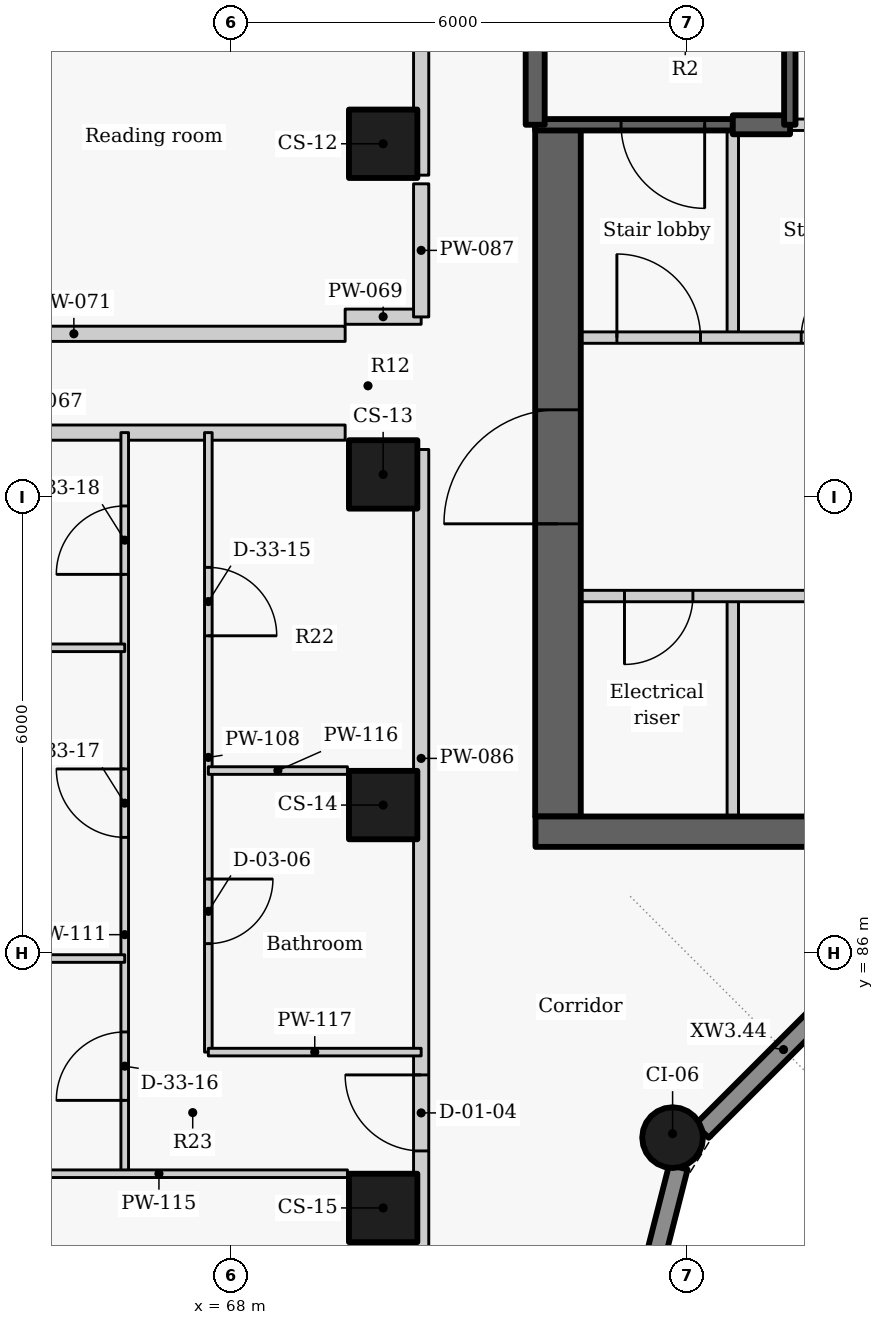
"""IFC4 building model, lengths in metres.
Left out: names, types, materials, properties, quantities, classifications, styles, units other than length and angle.
Written with IfcOpenShell. Run it as: python <this file> out.ifc"""

import sys

from ifc_helpers import new_model, si_unit, direction, frame, frame_2d, origin, origin_2d, place, context, subcontext, project, spatial, rectangle, circle, extrude, element, fill, save


model = new_model("IFC4")
c1 = context("Model", 3, precision=1e-05, world=origin(), true_north=direction((0.0, 1.0)))
c2 = subcontext(c1, "Body", "Model", "MODEL_VIEW")
j1 = project(units=[si_unit("LENGTHUNIT", "METRE"), si_unit("PLANEANGLEUNIT", "RADIAN")], contexts=[c1])
p1 = place(None, origin())
s1 = spatial("IfcSite", under=j1, at=p1, CompositionType="ELEMENT")
p2 = place(p1, origin())
s2 = spatial("IfcBuilding", under=s1, at=p2, CompositionType="ELEMENT")
p3 = place(p2, frame((0.0, 0.0, 229.5)))
s3 = spatial("IfcBuildingStorey", under=s2, at=p3, CompositionType="ELEMENT", Elevation=229.5)
for number, where, z_axis, x_axis in (
    (1, (70.0, 96.65, 0.0), (0.0, 0.0, 1.0), (0.0, -1.0, 0.0)),
    (2, (70.0, 92.3, 0.0), (0.0, 0.0, 1.0), (0.0, -1.0, 0.0)),
    (3, (70.0, 87.95, 0.0), (0.0, 0.0, 1.0), (0.0, -1.0, 0.0)),
    (4, (70.0, 82.65, 0.0), (0.0, 0.0, 1.0), (0.0, -1.0, 0.0)),
):
    element("IfcColumn", number, at=place(p3, frame(where, z_axis=z_axis, x_axis=x_axis)), inside=s3, PredefinedType="COLUMN", context=c2, shape_type="SweptSolid", body=[
        extrude(rectangle(XDim=0.9, YDim=0.9, at=origin_2d()), origin(), (0.0, 0.0, 1.0), 3.3),
    ])
p4 = place(p3, frame((73.808, 83.575, 0.0), z_axis=(0.0, 0.0, 1.0), x_axis=(-0.5, -0.866025403784, 0.0)))
e5 = element("IfcColumn", 5, at=p4, inside=s3, PredefinedType="COLUMN", context=c2, shape_type="SweptSolid", body=[
    extrude(circle(Radius=0.4, at=origin_2d()), origin(), (0.0, 0.0, 1.0), 3.3),
])
p5 = place(p3, frame((73.14, 80.27, 0.0), z_axis=(0.0, 0.0, 1.0), x_axis=(0.247055971283, 0.969001211069, 0.0)))
e6 = element("IfcWall", 6, at=p5, inside=s3, PredefinedType="SOLIDWALL", context=c2, shape_type="SweptSolid", body=[
    extrude(rectangle(XDim=3.01, YDim=0.25, at=frame_2d((1.505, 0.0))), origin(), (0.0, 0.0, 1.0), 2.425),
])
p6 = place(p3, frame((74.194, 83.661, 0.0), z_axis=(0.0, 0.0, 1.0), x_axis=(0.707106781187, 0.707106781187, 0.0)))
e7 = element("IfcWall", 7, at=p6, inside=s3, PredefinedType="SOLIDWALL", context=c2, shape_type="SweptSolid", body=[
    extrude(rectangle(XDim=3.033, YDim=0.25, at=frame_2d((1.517, 0.0))), origin(), (0.0, 0.0, 1.0), 2.425),
])
p7 = place(p3, frame((74.6, 87.8, 0.0), z_axis=(0.0, 0.0, 1.0), x_axis=(0.0, 1.0, 0.0)))
e8 = element("IfcWall", 8, at=p7, inside=s3, PredefinedType="PARTITIONING", context=c2, shape_type="SweptSolid", body=[
    extrude(rectangle(XDim=2.9, YDim=0.15, at=frame_2d((1.45, 0.0))), origin(), (0.0, 0.0, 1.0), 3.025),
])
p8 = place(p3, frame((74.6, 94.1, 0.0), z_axis=(0.0, 0.0, 1.0), x_axis=(0.0, 1.0, 0.0)))
e9 = element("IfcWall", 9, at=p8, inside=s3, PredefinedType="PARTITIONING", context=c2, shape_type="SweptSolid", body=[
    extrude(rectangle(XDim=2.8, YDim=0.15, at=frame_2d((1.4, 0.0))), origin(), (0.0, 0.0, 1.0), 3.025),
])
p9 = place(p3, frame((85.4, 90.7, 0.0), z_axis=(0.0, 0.0, 1.0), x_axis=(-1.0, 0.0, 0.0)))
e10 = element("IfcWall", 10, at=p9, inside=s3, PredefinedType="PARTITIONING", context=c2, shape_type="SweptSolid", body=[
    extrude(rectangle(XDim=13.4, YDim=0.15, at=frame_2d((6.7, 0.0))), origin(), (0.0, 0.0, 1.0), 3.025),
])
p10 = place(p9, frame((11.325, 0.0, 0.0)))
e11 = element("IfcOpeningElement", 11, at=p10, cuts=e10, PredefinedType="OPENING", context=c2, shape_type="SweptSolid", body=[
    extrude(rectangle(XDim=0.9, YDim=2.1, at=frame_2d((0.45, 1.05))), frame((0.0, 0.085, 0.0), z_axis=(0.0, -1.0, 0.0), x_axis=(1.0, 0.0, 0.0)), (0.0, 0.0, 1.0), 0.17),
])
p11 = place(p9, frame((6.3, 0.0, 0.0)))
e12 = element("IfcOpeningElement", 12, at=p11, cuts=e10, PredefinedType="OPENING", context=c2, shape_type="SweptSolid", body=[
    extrude(rectangle(XDim=0.9, YDim=2.1, at=frame_2d((0.45, 1.05))), frame((0.0, 0.085, 0.0), z_axis=(0.0, -1.0, 0.0), x_axis=(1.0, 0.0, 0.0)), (0.0, 0.0, 1.0), 0.17),
])
p12 = place(p9, frame((0.9, 0.0, 0.0)))
e13 = element("IfcOpeningElement", 13, at=p12, cuts=e10, PredefinedType="OPENING", context=c2, shape_type="SweptSolid", body=[
    extrude(rectangle(XDim=0.9, YDim=2.1, at=frame_2d((0.45, 1.05))), frame((0.0, 0.085, 0.0), z_axis=(0.0, -1.0, 0.0), x_axis=(1.0, 0.0, 0.0)), (0.0, 0.0, 1.0), 0.17),
])
p13 = place(p3, frame((72.3, 87.8, -0.275), z_axis=(0.0, 0.0, 1.0), x_axis=(0.0, 1.0, 0.0)))
e14 = element("IfcWall", 14, at=p13, inside=s3, PredefinedType="SHEAR", context=c2, shape_type="SweptSolid", body=[
    extrude(rectangle(XDim=9.1, YDim=0.6, at=frame_2d((4.55, 0.0))), origin(), (0.0, 0.0, 1.0), 3.3),
])
p14 = place(p13, frame((3.85, 0.0, 0.275)))
e15 = element("IfcOpeningElement", 15, at=p14, cuts=e14, PredefinedType="OPENING", context=c2, shape_type="SweptSolid", body=[
    extrude(rectangle(XDim=1.5, YDim=2.1, at=frame_2d((0.75, 1.05))), frame((0.0, 0.31, 0.0), z_axis=(0.0, -1.0, 0.0), x_axis=(1.0, 0.0, 0.0)), (0.0, 0.0, 1.0), 0.62),
])
p15 = place(p3, frame((72.0, 94.1, 0.0), z_axis=(0.0, 0.0, 1.0), x_axis=(1.0, 0.0, 0.0)))
e16 = element("IfcWall", 16, at=p15, inside=s3, PredefinedType="PARTITIONING", context=c2, shape_type="SweptSolid", body=[
    extrude(rectangle(XDim=10.703, YDim=0.15, at=frame_2d((5.352, 0.0))), origin(), (0.0, 0.0, 1.0), 3.025),
])
p16 = place(p15, frame((1.075, 0.0, 0.0)))
e17 = element("IfcOpeningElement", 17, at=p16, cuts=e16, PredefinedType="OPENING", context=c2, shape_type="SweptSolid", body=[
    extrude(rectangle(XDim=1.1, YDim=2.1, at=frame_2d((0.55, 1.05))), frame((0.0, 0.085, 0.0), z_axis=(0.0, -1.0, 0.0), x_axis=(1.0, 0.0, 0.0)), (0.0, 0.0, 1.0), 0.17),
])
p17 = place(p15, frame((3.5, 0.0, 0.0)))
e18 = element("IfcOpeningElement", 18, at=p17, cuts=e16, PredefinedType="OPENING", context=c2, shape_type="SweptSolid", body=[
    extrude(rectangle(XDim=0.9, YDim=2.1, at=frame_2d((0.45, 1.05))), frame((0.0, 0.085, 0.0), z_axis=(0.0, -1.0, 0.0), x_axis=(1.0, 0.0, 0.0)), (0.0, 0.0, 1.0), 0.17),
])
p18 = place(p15, frame((6.05, 0.0, 0.0)))
e19 = element("IfcOpeningElement", 19, at=p18, cuts=e16, PredefinedType="OPENING", context=c2, shape_type="SweptSolid", body=[
    extrude(rectangle(XDim=1.2, YDim=2.1, at=frame_2d((0.6, 1.05))), frame((0.0, 0.085, 0.0), z_axis=(0.0, -1.0, 0.0), x_axis=(1.0, 0.0, 0.0)), (0.0, 0.0, 1.0), 0.17),
])
p19 = place(p15, frame((8.225, 0.0, 0.0)))
e20 = element("IfcOpeningElement", 20, at=p19, cuts=e16, PredefinedType="OPENING", context=c2, shape_type="SweptSolid", body=[
    extrude(rectangle(XDim=0.9, YDim=2.1, at=frame_2d((0.45, 1.05))), frame((0.0, 0.085, 0.0), z_axis=(0.0, -1.0, 0.0), x_axis=(1.0, 0.0, 0.0)), (0.0, 0.0, 1.0), 0.17),
])
p20 = place(p15, frame((9.575, 0.0, 0.0)))
e21 = element("IfcOpeningElement", 21, at=p20, cuts=e16, PredefinedType="OPENING", context=c2, shape_type="SweptSolid", body=[
    extrude(rectangle(XDim=0.9, YDim=2.1, at=frame_2d((0.45, 1.05))), frame((0.0, 0.085, 0.0), z_axis=(0.0, -1.0, 0.0), x_axis=(1.0, 0.0, 0.0)), (0.0, 0.0, 1.0), 0.17),
])
p21 = place(p3, frame((74.6, 96.9, -0.275), z_axis=(0.0, 0.0, 1.0), x_axis=(-1.0, 0.0, 0.0)))
e22 = element("IfcWall", 22, at=p21, inside=s3, PredefinedType="SHEAR", context=c2, shape_type="SweptSolid", body=[
    extrude(rectangle(XDim=2.6, YDim=0.15, at=frame_2d((1.3, 0.0))), origin(), (0.0, 0.0, 1.0), 3.3),
])
p22 = place(p21, frame((0.37, 0.0, 0.275)))
e23 = element("IfcOpeningElement", 23, at=p22, cuts=e22, PredefinedType="OPENING", context=c2, shape_type="SweptSolid", body=[
    extrude(rectangle(XDim=1.1, YDim=2.1, at=frame_2d((0.55, 1.05))), frame((0.0, 0.085, 0.0), z_axis=(0.0, -1.0, 0.0), x_axis=(1.0, 0.0, 0.0)), (0.0, 0.0, 1.0), 0.17),
])
p23 = place(p3, frame((74.6, 96.9, -0.275), z_axis=(0.0, 0.0, 1.0), x_axis=(1.0, 0.0, 0.0)))
e24 = element("IfcWall", 24, at=p23, inside=s3, PredefinedType="SHEAR", context=c2, shape_type="SweptSolid", body=[
    extrude(rectangle(XDim=0.753, YDim=0.25, at=frame_2d((0.376, 0.0))), origin(), (0.0, 0.0, 1.0), 3.3),
])
p24 = place(p3, frame((75.347, 96.9, 0.0), z_axis=(0.0, 0.0, 1.0), x_axis=(1.0, 0.0, 0.0)))
e25 = element("IfcWall", 25, at=p24, inside=s3, PredefinedType="PARTITIONING", context=c2, shape_type="SweptSolid", body=[
    extrude(rectangle(XDim=5.206, YDim=0.15, at=frame_2d((2.603, 0.0))), origin(), (0.0, 0.0, 1.0), 3.025),
])
p25 = place(p24, frame((2.803, 0.0, 0.0)))
e26 = element("IfcOpeningElement", 26, at=p25, cuts=e25, PredefinedType="OPENING", context=c2, shape_type="SweptSolid", body=[
    extrude(rectangle(XDim=1.0, YDim=2.1, at=frame_2d((0.5, 1.05))), frame((0.0, 0.085, 0.0), z_axis=(0.0, -1.0, 0.0), x_axis=(1.0, 0.0, 0.0)), (0.0, 0.0, 1.0), 0.17),
])
p26 = place(p3, frame((75.35, 96.9, -0.275), z_axis=(0.0, 0.0, 1.0), x_axis=(0.0, 1.0, 0.0)))
e27 = element("IfcWall", 27, at=p26, inside=s3, PredefinedType="SHEAR", context=c2, shape_type="SweptSolid", body=[
    extrude(rectangle(XDim=1.503, YDim=0.15, at=frame_2d((0.751, 0.0))), origin(), (0.0, 0.0, 1.0), 3.3),
])
p27 = place(p3, frame((72.0, 96.9, -0.275), z_axis=(0.0, 0.0, 1.0), x_axis=(0.0, 1.0, 0.0)))
e28 = element("IfcWall", 28, at=p27, inside=s3, PredefinedType="SHEAR", context=c2, shape_type="SweptSolid", body=[
    extrude(rectangle(XDim=5.15, YDim=0.25, at=frame_2d((2.575, 0.0))), origin(), (0.0, 0.0, 1.0), 3.3),
])
p28 = place(p3, frame((61.611, 92.85, 0.0), z_axis=(0.0, 0.0, 1.0), x_axis=(1.0, 0.0, 0.0)))
e29 = element("IfcWall", 29, at=p28, inside=s3, PredefinedType="PARTITIONING", context=c2, shape_type="SweptSolid", body=[
    extrude(rectangle(XDim=7.889, YDim=0.2, at=frame_2d((3.944, 0.0))), origin(), (0.0, 0.0, 1.0), 2.405),
])
p29 = place(p3, frame((69.5, 94.375, 0.0), z_axis=(0.0, 0.0, 1.0), x_axis=(1.0, 0.0, 0.0)))
e30 = element("IfcWall", 30, at=p29, inside=s3, PredefinedType="PARTITIONING", context=c2, shape_type="SweptSolid", body=[
    extrude(rectangle(XDim=1.0, YDim=0.2, at=frame_2d((0.5, 0.0))), origin(), (0.0, 0.0, 1.0), 2.505),
])
p30 = place(p3, frame((62.362, 94.15, 0.0), z_axis=(0.0, 0.0, 1.0), x_axis=(1.0, 0.0, 0.0)))
e31 = element("IfcWall", 31, at=p30, inside=s3, PredefinedType="PARTITIONING", context=c2, shape_type="SweptSolid", body=[
    extrude(rectangle(XDim=7.138, YDim=0.2, at=frame_2d((3.569, 0.0))), origin(), (0.0, 0.0, 1.0), 2.405),
])
p31 = place(p3, frame((70.5, 72.577, 0.0), z_axis=(0.0, 0.0, 1.0), x_axis=(0.0, 1.0, 0.0)))
e32 = element("IfcWall", 32, at=p31, inside=s3, PredefinedType="PARTITIONING", context=c2, shape_type="SweptSolid", body=[
    extrude(rectangle(XDim=20.051, YDim=0.2, at=frame_2d((10.025, 0.0))), origin(), (0.0, 0.0, 1.0), 3.025),
])
p32 = place(p31, frame((3.023, 0.0, 0.0)))
e33 = element("IfcOpeningElement", 33, at=p32, cuts=e32, PredefinedType="OPENING", context=c2, shape_type="SweptSolid", body=[
    extrude(rectangle(XDim=1.0, YDim=2.1, at=frame_2d((0.5, 1.05))), frame((0.0, 0.11, 0.0), z_axis=(0.0, -1.0, 0.0), x_axis=(1.0, 0.0, 0.0)), (0.0, 0.0, 1.0), 0.22),
])
p33 = place(p31, frame((6.923, 0.0, 0.0)))
e34 = element("IfcOpeningElement", 34, at=p33, cuts=e32, PredefinedType="OPENING", context=c2, shape_type="SweptSolid", body=[
    extrude(rectangle(XDim=1.0, YDim=2.1, at=frame_2d((0.5, 1.05))), frame((0.0, 0.11, 0.0), z_axis=(0.0, -1.0, 0.0), x_axis=(1.0, 0.0, 0.0)), (0.0, 0.0, 1.0), 0.22),
])
p34 = place(p31, frame((10.823, 0.0, 0.0)))
e35 = element("IfcOpeningElement", 35, at=p34, cuts=e32, PredefinedType="OPENING", context=c2, shape_type="SweptSolid", body=[
    extrude(rectangle(XDim=1.0, YDim=2.1, at=frame_2d((0.5, 1.05))), frame((0.0, 0.11, 0.0), z_axis=(0.0, -1.0, 0.0), x_axis=(1.0, 0.0, 0.0)), (0.0, 0.0, 1.0), 0.22),
])
p35 = place(p3, frame((70.5, 94.372, 0.0), z_axis=(0.0, 0.0, 1.0), x_axis=(0.0, 1.0, 0.0)))
e36 = element("IfcWall", 36, at=p35, inside=s3, PredefinedType="PARTITIONING", context=c2, shape_type="SweptSolid", body=[
    extrude(rectangle(XDim=1.751, YDim=0.2, at=frame_2d((0.875, 0.0))), origin(), (0.0, 0.0, 1.0), 3.025),
])
p36 = place(p3, frame((70.5, 96.237, 0.0), z_axis=(0.0, 0.0, 1.0), x_axis=(0.0, 1.0, 0.0)))
e37 = element("IfcWall", 37, at=p36, inside=s3, PredefinedType="PARTITIONING", context=c2, shape_type="SweptSolid", body=[
    extrude(rectangle(XDim=5.176, YDim=0.2, at=frame_2d((2.588, 0.0))), origin(), (0.0, 0.0, 1.0), 3.025),
])
p37 = place(p36, frame((2.088, 0.0, 0.0)))
e38 = element("IfcOpeningElement", 38, at=p37, cuts=e37, PredefinedType="OPENING", context=c2, shape_type="SweptSolid", body=[
    extrude(rectangle(XDim=1.0, YDim=2.1, at=frame_2d((0.5, 1.05))), frame((0.0, 0.11, 0.0), z_axis=(0.0, -1.0, 0.0), x_axis=(1.0, 0.0, 0.0)), (0.0, 0.0, 1.0), 0.22),
])
p38 = place(p3, frame((67.7, 92.85, 0.0), z_axis=(0.0, 0.0, 1.0), x_axis=(0.0, -1.0, 0.0)))
e39 = element("IfcWall", 39, at=p38, inside=s3, PredefinedType="PARTITIONING", context=c2, shape_type="SweptSolid", body=[
    extrude(rectangle(XDim=8.15, YDim=0.1, at=frame_2d((4.075, 0.0))), origin(), (0.0, 0.0, 1.0), 3.025),
])
p39 = place(p38, frame((5.873, 0.0, 0.0)))
e40 = element("IfcOpeningElement", 40, at=p39, cuts=e39, PredefinedType="OPENING", context=c2, shape_type="SweptSolid", body=[
    extrude(rectangle(XDim=0.85, YDim=2.1, at=frame_2d((0.425, 1.05))), frame((0.0, 0.06, 0.0), z_axis=(0.0, -1.0, 0.0), x_axis=(1.0, 0.0, 0.0)), (0.0, 0.0, 1.0), 0.12),
])
p40 = place(p38, frame((1.773, 0.0, 0.0)))
e41 = element("IfcOpeningElement", 41, at=p40, cuts=e39, PredefinedType="OPENING", context=c2, shape_type="SweptSolid", body=[
    extrude(rectangle(XDim=0.9, YDim=2.1, at=frame_2d((0.45, 1.05))), frame((0.0, 0.06, 0.0), z_axis=(0.0, -1.0, 0.0), x_axis=(1.0, 0.0, 0.0)), (0.0, 0.0, 1.0), 0.12),
])
p41 = place(p3, frame((66.6, 83.1, 0.0), z_axis=(0.0, 0.0, 1.0), x_axis=(0.0, 1.0, 0.0)))
e42 = element("IfcWall", 42, at=p41, inside=s3, PredefinedType="PARTITIONING", context=c2, shape_type="SweptSolid", body=[
    extrude(rectangle(XDim=9.75, YDim=0.1, at=frame_2d((4.875, 0.0))), origin(), (0.0, 0.0, 1.0), 3.025),
])
p42 = place(p41, frame((0.965, 0.0, 0.0)))
e43 = element("IfcOpeningElement", 43, at=p42, cuts=e42, PredefinedType="OPENING", context=c2, shape_type="SweptSolid", body=[
    extrude(rectangle(XDim=0.9, YDim=2.1, at=frame_2d((0.45, 1.05))), frame((0.0, 0.06, 0.0), z_axis=(0.0, -1.0, 0.0), x_axis=(1.0, 0.0, 0.0)), (0.0, 0.0, 1.0), 0.12),
])
p43 = place(p41, frame((4.425, 0.0, 0.0)))
e44 = element("IfcOpeningElement", 44, at=p43, cuts=e42, PredefinedType="OPENING", context=c2, shape_type="SweptSolid", body=[
    extrude(rectangle(XDim=0.9, YDim=2.1, at=frame_2d((0.45, 1.05))), frame((0.0, 0.06, 0.0), z_axis=(0.0, -1.0, 0.0), x_axis=(1.0, 0.0, 0.0)), (0.0, 0.0, 1.0), 0.12),
])
p44 = place(p41, frame((7.885, 0.0, 0.0)))
e45 = element("IfcOpeningElement", 45, at=p44, cuts=e42, PredefinedType="OPENING", context=c2, shape_type="SweptSolid", body=[
    extrude(rectangle(XDim=0.9, YDim=2.1, at=frame_2d((0.45, 1.05))), frame((0.0, 0.06, 0.0), z_axis=(0.0, -1.0, 0.0), x_axis=(1.0, 0.0, 0.0)), (0.0, 0.0, 1.0), 0.12),
])
p45 = place(p3, frame((64.571, 83.1, 0.0), z_axis=(0.0, 0.0, 1.0), x_axis=(1.0, 0.0, 0.0)))
e46 = element("IfcWall", 46, at=p45, inside=s3, PredefinedType="PARTITIONING", context=c2, shape_type="SweptSolid", body=[
    extrude(rectangle(XDim=4.959, YDim=0.1, at=frame_2d((2.48, 0.0))), origin(), (0.0, 0.0, 1.0), 3.025),
])
p46 = place(p3, frame((67.7, 88.404, 0.0), z_axis=(0.0, 0.0, 1.0), x_axis=(1.0, 0.0, 0.0)))
e47 = element("IfcWall", 47, at=p46, inside=s3, PredefinedType="PARTITIONING", context=c2, shape_type="SweptSolid", body=[
    extrude(rectangle(XDim=1.83, YDim=0.1, at=frame_2d((0.915, 0.0))), origin(), (0.0, 0.0, 1.0), 3.025),
])
p47 = place(p3, frame((67.7, 84.7, 0.0), z_axis=(0.0, 0.0, 1.0), x_axis=(1.0, 0.0, 0.0)))
e48 = element("IfcWall", 48, at=p47, inside=s3, PredefinedType="PARTITIONING", context=c2, shape_type="SweptSolid", body=[
    extrude(rectangle(XDim=2.8, YDim=0.1, at=frame_2d((1.4, 0.0))), origin(), (0.0, 0.0, 1.0), 2.505),
])
p48 = place(p3, frame((57.616, 85.931, 0.0), z_axis=(0.0, 0.0, 1.0), x_axis=(1.0, 0.0, 0.0)))
e49 = element("IfcWall", 49, at=p48, inside=s3, PredefinedType="PARTITIONING", context=c2, shape_type="SweptSolid", body=[
    extrude(rectangle(XDim=8.984, YDim=0.1, at=frame_2d((4.492, 0.0))), origin(), (0.0, 0.0, 1.0), 2.405),
])
p49 = place(p3, frame((59.977, 90.019, 0.0), z_axis=(0.0, 0.0, 1.0), x_axis=(1.0, 0.0, 0.0)))
e50 = element("IfcWall", 50, at=p49, inside=s3, PredefinedType="PARTITIONING", context=c2, shape_type="SweptSolid", body=[
    extrude(rectangle(XDim=6.623, YDim=0.1, at=frame_2d((3.312, 0.0))), origin(), (0.0, 0.0, 1.0), 2.405),
])
p50 = place(p3, frame((72.004, 87.6, -0.275), z_axis=(0.0, 0.0, 1.0), x_axis=(1.0, 0.0, 0.0)))
e51 = element("IfcWall", 51, at=p50, inside=s3, PredefinedType="SHEAR", context=c2, shape_type="SweptSolid", body=[
    extrude(rectangle(XDim=15.992, YDim=0.4, at=frame_2d((7.996, 0.0))), origin(), (0.0, 0.0, 1.0), 3.3),
])
p51 = place(p10, origin())
e52 = element("IfcDoor", 52, at=p51, inside=s3, OperationType="SINGLE_SWING_RIGHT", PredefinedType="DOOR", context=c2, shape_type="SweptSolid", body=[
    extrude(rectangle(XDim=0.9, YDim=2.1, at=frame_2d((0.45, 1.05))), frame((0.0, 0.025, 0.0), z_axis=(0.0, -1.0, 0.0), x_axis=(1.0, 0.0, 0.0)), (0.0, 0.0, 1.0), 0.05),
])
fill(e11, e52)
p52 = place(p16, origin())
e53 = element("IfcDoor", 53, at=p52, inside=s3, OperationType="SINGLE_SWING_LEFT", PredefinedType="DOOR", context=c2, shape_type="SweptSolid", body=[
    extrude(rectangle(XDim=1.1, YDim=2.1, at=frame_2d((0.55, 1.05))), frame((0.0, 0.025, 0.0), z_axis=(0.0, -1.0, 0.0), x_axis=(1.0, 0.0, 0.0)), (0.0, 0.0, 1.0), 0.05),
])
fill(e17, e53)
p53 = place(p17, origin())
e54 = element("IfcDoor", 54, at=p53, inside=s3, OperationType="SINGLE_SWING_RIGHT", PredefinedType="DOOR", context=c2, shape_type="SweptSolid", body=[
    extrude(rectangle(XDim=0.9, YDim=2.1, at=frame_2d((0.45, 1.05))), frame((0.0, 0.025, 0.0), z_axis=(0.0, -1.0, 0.0), x_axis=(1.0, 0.0, 0.0)), (0.0, 0.0, 1.0), 0.05),
])
fill(e18, e54)
p54 = place(p22, origin())
e55 = element("IfcDoor", 55, at=p54, inside=s3, OperationType="SINGLE_SWING_LEFT", PredefinedType="DOOR", context=c2, shape_type="SweptSolid", body=[
    extrude(rectangle(XDim=1.1, YDim=2.1, at=frame_2d((0.55, 1.05))), frame((0.0, 0.025, 0.0), z_axis=(0.0, -1.0, 0.0), x_axis=(1.0, 0.0, 0.0)), (0.0, 0.0, 1.0), 0.05),
])
fill(e23, e55)
p55 = place(p34, origin())
e56 = element("IfcDoor", 56, at=p55, inside=s3, OperationType="SINGLE_SWING_RIGHT", PredefinedType="DOOR", context=c2, shape_type="SweptSolid", body=[
    extrude(rectangle(XDim=1.0, YDim=2.1, at=frame_2d((0.5, 1.05))), frame((0.0, 0.025, 0.0), z_axis=(0.0, -1.0, 0.0), x_axis=(1.0, 0.0, 0.0)), (0.0, 0.0, 1.0), 0.05),
])
fill(e35, e56)
p56 = place(p39, origin())
e57 = element("IfcDoor", 57, at=p56, inside=s3, OperationType="SINGLE_SWING_LEFT", PredefinedType="DOOR", context=c2, shape_type="SweptSolid", body=[
    extrude(rectangle(XDim=0.85, YDim=2.1, at=frame_2d((0.425, 1.05))), frame((0.0, 0.025, 0.0), z_axis=(0.0, -1.0, 0.0), x_axis=(1.0, 0.0, 0.0)), (0.0, 0.0, 1.0), 0.05),
])
fill(e40, e57)
p57 = place(p40, origin())
e58 = element("IfcDoor", 58, at=p57, inside=s3, OperationType="SINGLE_SWING_RIGHT", PredefinedType="DOOR", context=c2, shape_type="SweptSolid", body=[
    extrude(rectangle(XDim=0.9, YDim=2.1, at=frame_2d((0.45, 1.05))), frame((0.0, 0.025, 0.0), z_axis=(0.0, -1.0, 0.0), x_axis=(1.0, 0.0, 0.0)), (0.0, 0.0, 1.0), 0.05),
])
fill(e41, e58)
p58 = place(p42, origin())
e59 = element("IfcDoor", 59, at=p58, inside=s3, OperationType="SINGLE_SWING_LEFT", PredefinedType="DOOR", context=c2, shape_type="SweptSolid", body=[
    extrude(rectangle(XDim=0.9, YDim=2.1, at=frame_2d((0.45, 1.05))), frame((0.0, 0.025, 0.0), z_axis=(0.0, -1.0, 0.0), x_axis=(1.0, 0.0, 0.0)), (0.0, 0.0, 1.0), 0.05),
])
fill(e43, e59)
p59 = place(p43, origin())
e60 = element("IfcDoor", 60, at=p59, inside=s3, OperationType="SINGLE_SWING_RIGHT", PredefinedType="DOOR", context=c2, shape_type="SweptSolid", body=[
    extrude(rectangle(XDim=0.9, YDim=2.1, at=frame_2d((0.45, 1.05))), frame((0.0, 0.025, 0.0), z_axis=(0.0, -1.0, 0.0), x_axis=(1.0, 0.0, 0.0)), (0.0, 0.0, 1.0), 0.05),
])
fill(e44, e60)
p60 = place(p44, origin())
e61 = element("IfcDoor", 61, at=p60, inside=s3, OperationType="SINGLE_SWING_LEFT", PredefinedType="DOOR", context=c2, shape_type="SweptSolid", body=[
    extrude(rectangle(XDim=0.9, YDim=2.1, at=frame_2d((0.45, 1.05))), frame((0.0, 0.025, 0.0), z_axis=(0.0, -1.0, 0.0), x_axis=(1.0, 0.0, 0.0)), (0.0, 0.0, 1.0), 0.05),
])
fill(e45, e61)
p61 = place(p14, origin())
e62 = element("IfcDoor", 62, at=p61, inside=s3, OperationType="DOUBLE_DOOR_SINGLE_SWING", PredefinedType="DOOR", context=c2, shape_type="SweptSolid", body=[
    extrude(rectangle(XDim=1.5, YDim=2.1, at=frame_2d((0.75, 1.05))), frame((0.0, 0.025, 0.0), z_axis=(0.0, -1.0, 0.0), x_axis=(1.0, 0.0, 0.0)), (0.0, 0.0, 1.0), 0.05),
])
fill(e15, e62)
save(model, sys.argv[1])
